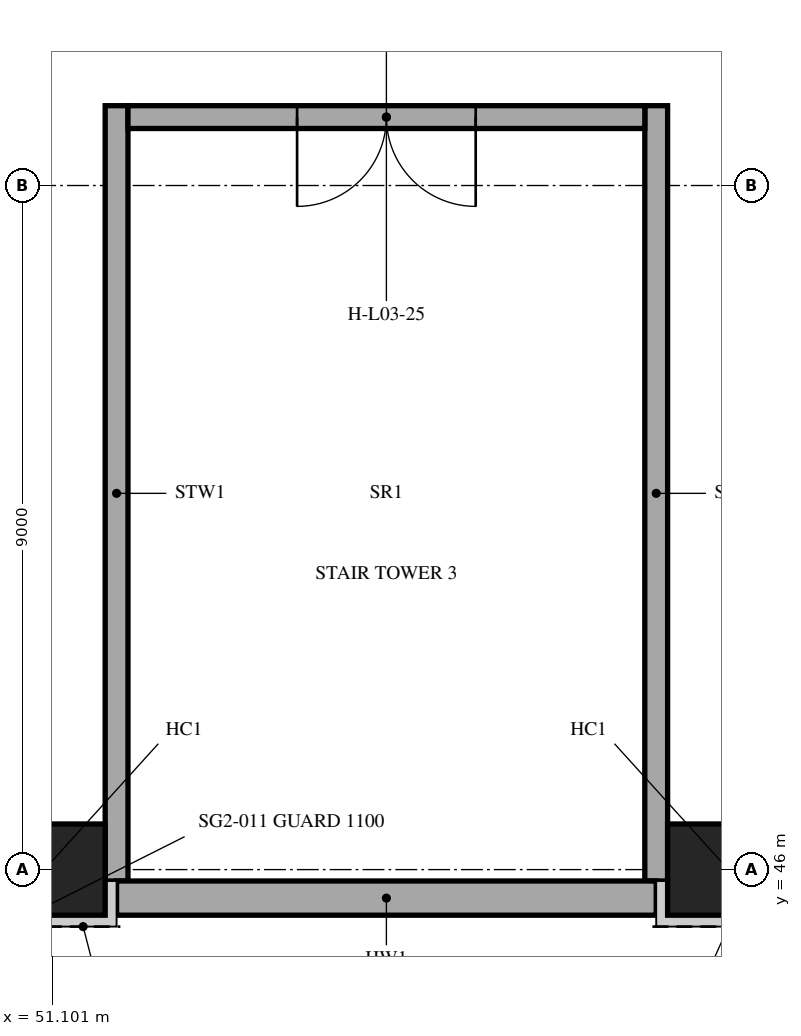
"""IFC4 building model, lengths in metres.
Left out: names, types, materials, properties, quantities, classifications, styles, units other than length and angle.
Written with IfcOpenShell. Run it as: python <this file> out.ifc"""

import sys

from ifc_helpers import new_model, si_unit, direction, frame, frame_2d, origin, origin_2d, place, context, subcontext, project, spatial, rectangle, extrude, element, fill, save


model = new_model("IFC4")
c1 = context("Model", 3, precision=1e-05, world=origin(), true_north=direction((0.0, 1.0)))
c2 = subcontext(c1, "Body", "Model", "MODEL_VIEW")
j1 = project(units=[si_unit("LENGTHUNIT", "METRE"), si_unit("PLANEANGLEUNIT", "RADIAN")], contexts=[c1])
p1 = place(None, origin())
s1 = spatial("IfcSite", under=j1, at=p1, CompositionType="ELEMENT")
p2 = place(p1, origin())
s2 = spatial("IfcBuilding", under=s1, at=p2, CompositionType="ELEMENT")
p3 = place(p2, frame((0.0, 0.0, 15.0)))
s3 = spatial("IfcBuildingStorey", under=s2, at=p3, CompositionType="ELEMENT", Elevation=15.0)
for number, where, z_axis, x_axis in (
    (1, (51.0, 46.0, 0.0), (0.0, 0.0, 1.0), (1.0, 0.0, 0.0)),
    (2, (60.0, 46.0, 0.0), (0.0, 0.0, 1.0), (1.0, 0.0, 0.0)),
):
    element("IfcColumn", number, at=place(p3, frame(where, z_axis=z_axis, x_axis=x_axis)), inside=s3, PredefinedType="COLUMN", context=c2, shape_type="SweptSolid", body=[
        extrude(rectangle(XDim=1.6, YDim=1.2, at=origin_2d()), origin(), (0.0, 0.0, 1.0), 4.2),
    ])
for number, where, z_axis, x_axis in (
    (3, (51.95, 45.85, 0.0), (0.0, 0.0, 1.0), (0.0, 1.0, 0.0)),
    (4, (59.05, 45.85, 0.0), (0.0, 0.0, 1.0), (0.0, 1.0, 0.0)),
):
    element("IfcWall", number, at=place(p3, frame(where, z_axis=z_axis, x_axis=x_axis)), inside=s3, PredefinedType="SHEAR", context=c2, shape_type="SweptSolid", body=[
        extrude(rectangle(XDim=10.2, YDim=0.3, at=frame_2d((5.1, 0.0))), origin(), (0.0, 0.0, 1.0), 3.9),
    ])
p4 = place(p3, frame((52.1, 55.9, 0.0), z_axis=(0.0, 0.0, 1.0), x_axis=(1.0, 0.0, 0.0)))
e5 = element("IfcWall", 5, at=p4, inside=s3, PredefinedType="SHEAR", context=c2, shape_type="SweptSolid", body=[
    extrude(rectangle(XDim=6.8, YDim=0.3, at=frame_2d((3.4, 0.0))), origin(), (0.0, 0.0, 1.0), 3.9),
])
p5 = place(p4, frame((2.225, 0.0, 0.0)))
e6 = element("IfcOpeningElement", 6, at=p5, cuts=e5, PredefinedType="OPENING", context=c2, shape_type="SweptSolid", body=[
    extrude(rectangle(XDim=2.35, YDim=2.1, at=frame_2d((1.175, 1.05))), frame((0.0, 0.16, 0.0), z_axis=(0.0, -1.0, 0.0), x_axis=(1.0, 0.0, 0.0)), (0.0, 0.0, 1.0), 0.32),
])
p6 = place(p3, frame((51.95, 45.625, 0.0), z_axis=(0.0, 0.0, 1.0), x_axis=(1.0, 0.0, 0.0)))
e7 = element("IfcWall", 7, at=p6, inside=s3, PredefinedType="SOLIDWALL", context=c2, shape_type="SweptSolid", body=[
    extrude(rectangle(XDim=7.1, YDim=0.45, at=frame_2d((3.55, 0.0))), origin(), (0.0, 0.0, 1.0), 4.2),
])
p7 = place(p5, frame((2.35, 0.0, 0.0), z_axis=(0.0, 0.0, 1.0), x_axis=(-1.0, 0.0, 0.0)))
e8 = element("IfcDoor", 8, at=p7, inside=s3, OperationType="DOUBLE_DOOR_SINGLE_SWING", PredefinedType="DOOR", context=c2, shape_type="SweptSolid", body=[
    extrude(rectangle(XDim=2.35, YDim=2.1, at=frame_2d((1.175, 1.05))), frame((0.0, 0.025, 0.0), z_axis=(0.0, -1.0, 0.0), x_axis=(1.0, 0.0, 0.0)), (0.0, 0.0, 1.0), 0.05),
])
fill(e6, e8)
save(model, sys.argv[1])
